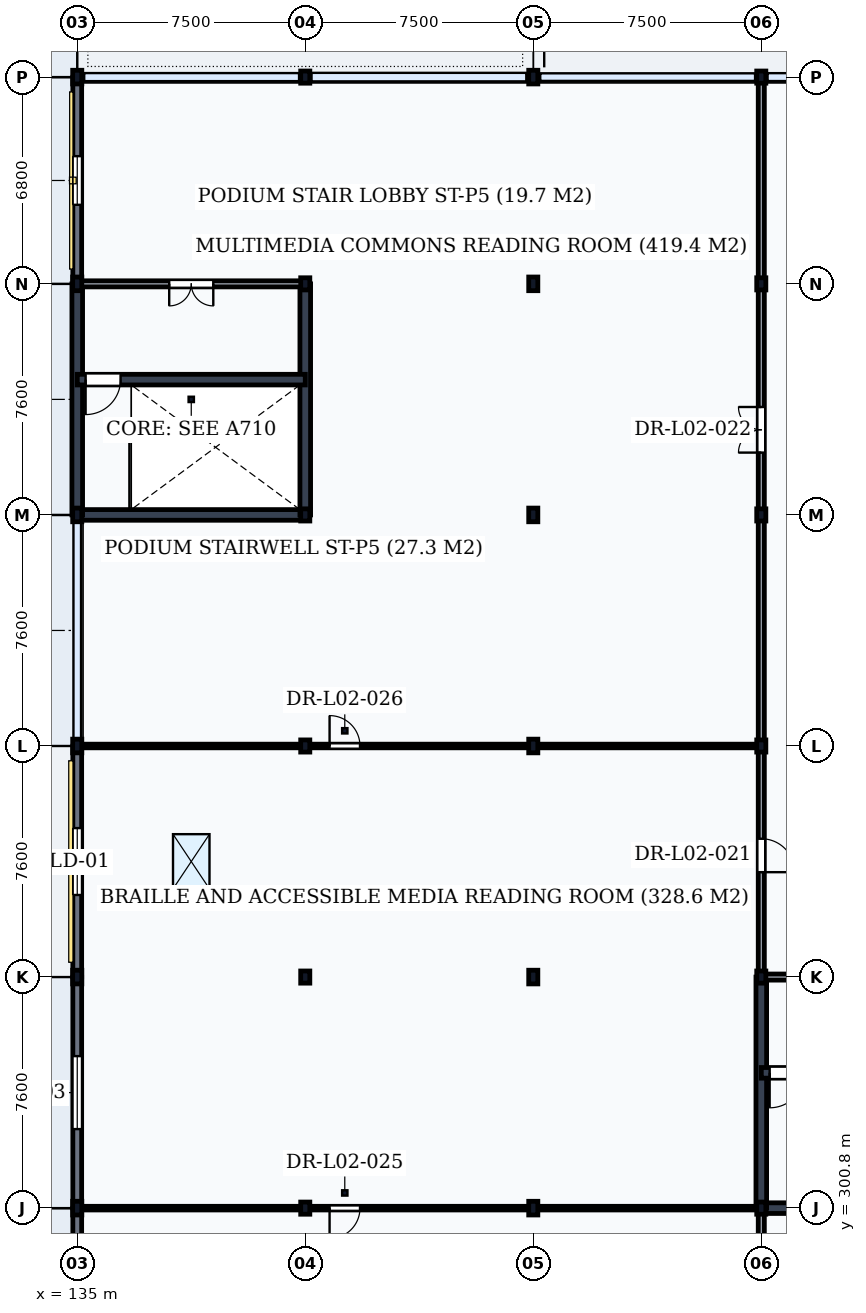
"""IFC4 building model, lengths in metres.
Left out: names, types, materials, properties, quantities, classifications, styles, units other than length and angle.
Written with IfcOpenShell. Run it as: python <this file> out.ifc"""

import sys

from ifc_helpers import new_model, si_unit, direction, frame, frame_2d, origin, origin_2d, place, context, subcontext, project, spatial, rectangle, i_section, extrude, element, fill, save


model = new_model("IFC4")
c1 = context("Model", 3, precision=1e-05, world=origin(), true_north=direction((0.0, 1.0)))
c2 = subcontext(c1, "Body", "Model", "MODEL_VIEW")
j1 = project(units=[si_unit("LENGTHUNIT", "METRE"), si_unit("PLANEANGLEUNIT", "RADIAN")], contexts=[c1])
p1 = place(None, origin())
s1 = spatial("IfcSite", under=j1, at=p1, CompositionType="ELEMENT")
p2 = place(p1, origin())
s2 = spatial("IfcBuilding", under=s1, at=p2, CompositionType="ELEMENT")
p3 = place(p2, frame((0.0, 0.0, 5.4)))
s3 = spatial("IfcBuildingStorey", under=s2, at=p3, CompositionType="ELEMENT", Elevation=5.4)
for number, where, z_axis, x_axis in (
    (1, (135.0, 300.8, 0.0), (0.0, 0.0, 1.0), (1.0, 0.0, 0.0)),
    (2, (135.0, 308.4, 0.0), (0.0, 0.0, 1.0), (1.0, 0.0, 0.0)),
    (3, (135.0, 316.0, 0.0), (0.0, 0.0, 1.0), (1.0, 0.0, 0.0)),
    (4, (135.0, 323.6, 0.0), (0.0, 0.0, 1.0), (1.0, 0.0, 0.0)),
    (5, (135.0, 331.2, 0.0), (0.0, 0.0, 1.0), (1.0, 0.0, 0.0)),
    (6, (135.0, 338.0, 0.0), (0.0, 0.0, 1.0), (1.0, 0.0, 0.0)),
):
    element("IfcColumn", number, at=place(p3, frame(where, z_axis=z_axis, x_axis=x_axis)), inside=s3, PredefinedType="COLUMN", context=c2, shape_type="SweptSolid", body=[
        extrude(i_section(OverallWidth=0.3, OverallDepth=0.45, WebThickness=0.014, FlangeThickness=0.026, FilletRadius=0.027, at=origin_2d()), origin(), (0.0, 0.0, 1.0), 5.1),
    ])
for number, where, z_axis, x_axis in (
    (7, (142.5, 300.8, 0.0), (0.0, 0.0, 1.0), (1.0, 0.0, 0.0)),
    (8, (142.5, 308.4, 0.0), (0.0, 0.0, 1.0), (1.0, 0.0, 0.0)),
    (9, (142.5, 316.0, 0.0), (0.0, 0.0, 1.0), (1.0, 0.0, 0.0)),
    (10, (142.5, 323.6, 0.0), (0.0, 0.0, 1.0), (1.0, 0.0, 0.0)),
    (11, (142.5, 331.2, 0.0), (0.0, 0.0, 1.0), (1.0, 0.0, 0.0)),
    (12, (142.5, 338.0, 0.0), (0.0, 0.0, 1.0), (1.0, 0.0, 0.0)),
):
    element("IfcColumn", number, at=place(p3, frame(where, z_axis=z_axis, x_axis=x_axis)), inside=s3, PredefinedType="COLUMN", context=c2, shape_type="SweptSolid", body=[
        extrude(i_section(OverallWidth=0.3, OverallDepth=0.4, WebThickness=0.013, FlangeThickness=0.024, FilletRadius=0.027, at=origin_2d()), origin(), (0.0, 0.0, 1.0), 5.1),
    ])
for number, where, z_axis, x_axis in (
    (13, (150.0, 300.8, 0.0), (0.0, 0.0, 1.0), (1.0, 0.0, 0.0)),
    (14, (150.0, 308.4, 0.0), (0.0, 0.0, 1.0), (1.0, 0.0, 0.0)),
    (15, (150.0, 316.0, 0.0), (0.0, 0.0, 1.0), (1.0, 0.0, 0.0)),
    (16, (150.0, 323.6, 0.0), (0.0, 0.0, 1.0), (1.0, 0.0, 0.0)),
    (17, (150.0, 331.2, 0.0), (0.0, 0.0, 1.0), (1.0, 0.0, 0.0)),
    (18, (150.0, 338.0, 0.0), (0.0, 0.0, 1.0), (1.0, 0.0, 0.0)),
):
    element("IfcColumn", number, at=place(p3, frame(where, z_axis=z_axis, x_axis=x_axis)), inside=s3, PredefinedType="COLUMN", context=c2, shape_type="SweptSolid", body=[
        extrude(i_section(OverallWidth=0.3, OverallDepth=0.45, WebThickness=0.014, FlangeThickness=0.026, FilletRadius=0.027, at=origin_2d()), origin(), (0.0, 0.0, 1.0), 5.1),
    ])
for number, where, z_axis, x_axis in (
    (19, (157.5, 300.8, 0.0), (0.0, 0.0, 1.0), (1.0, 0.0, 0.0)),
    (20, (157.5, 308.4, 0.0), (0.0, 0.0, 1.0), (1.0, 0.0, 0.0)),
    (21, (157.5, 316.0, 0.0), (0.0, 0.0, 1.0), (1.0, 0.0, 0.0)),
    (22, (157.5, 323.6, 0.0), (0.0, 0.0, 1.0), (1.0, 0.0, 0.0)),
    (23, (157.5, 331.2, 0.0), (0.0, 0.0, 1.0), (1.0, 0.0, 0.0)),
    (24, (157.5, 338.0, 0.0), (0.0, 0.0, 1.0), (1.0, 0.0, 0.0)),
):
    element("IfcColumn", number, at=place(p3, frame(where, z_axis=z_axis, x_axis=x_axis)), inside=s3, PredefinedType="COLUMN", context=c2, shape_type="SweptSolid", body=[
        extrude(i_section(OverallWidth=0.3, OverallDepth=0.4, WebThickness=0.013, FlangeThickness=0.024, FilletRadius=0.027, at=origin_2d()), origin(), (0.0, 0.0, 1.0), 5.1),
    ])
p4 = place(p3, frame((135.0, 293.206, 0.0), z_axis=(0.0, 0.0, 1.0), x_axis=(0.0, 1.0, 0.0)))
e25 = element("IfcWall", 25, at=p4, inside=s3, PredefinedType="SOLIDWALL", context=c2, shape_type="SweptSolid", body=[
    extrude(rectangle(XDim=7.588, YDim=0.29, at=frame_2d((3.794, 0.0))), origin(), (0.0, 0.0, 1.0), 4.578),
])
p5 = place(p4, frame((2.494, 0.0, 0.95)))
e26 = element("IfcOpeningElement", 26, at=p5, cuts=e25, PredefinedType="OPENING", context=c2, shape_type="SweptSolid", body=[
    extrude(rectangle(XDim=2.6, YDim=3.0, at=frame_2d((1.3, 1.5))), frame((0.0, 0.16, 0.0), z_axis=(0.0, -1.0, 0.0), x_axis=(1.0, 0.0, 0.0)), (0.0, 0.0, 1.0), 0.32),
])
p6 = place(p3, frame((135.0, 300.806, 0.0), z_axis=(0.0, 0.0, 1.0), x_axis=(0.0, 1.0, 0.0)))
e27 = element("IfcWall", 27, at=p6, inside=s3, PredefinedType="SOLIDWALL", context=c2, shape_type="SweptSolid", body=[
    extrude(rectangle(XDim=7.588, YDim=0.29, at=frame_2d((3.794, 0.0))), origin(), (0.0, 0.0, 1.0), 4.578),
])
p7 = place(p6, frame((2.594, 0.0, 0.95)))
e28 = element("IfcOpeningElement", 28, at=p7, cuts=e27, PredefinedType="OPENING", context=c2, shape_type="SweptSolid", body=[
    extrude(rectangle(XDim=2.4, YDim=2.8, at=frame_2d((1.2, 1.4))), frame((0.0, 0.16, 0.0), z_axis=(0.0, -1.0, 0.0), x_axis=(1.0, 0.0, 0.0)), (0.0, 0.0, 1.0), 0.32),
])
p8 = place(p3, frame((135.0, 308.406, 0.0), z_axis=(0.0, 0.0, 1.0), x_axis=(0.0, 1.0, 0.0)))
e29 = element("IfcWall", 29, at=p8, inside=s3, PredefinedType="SOLIDWALL", context=c2, shape_type="SweptSolid", body=[
    extrude(rectangle(XDim=7.588, YDim=0.29, at=frame_2d((3.794, 0.0))), origin(), (0.0, 0.0, 1.0), 4.578),
])
p9 = place(p8, frame((2.694, 0.0, 0.95)))
e30 = element("IfcOpeningElement", 30, at=p9, cuts=e29, PredefinedType="OPENING", context=c2, shape_type="SweptSolid", body=[
    extrude(rectangle(XDim=2.2, YDim=2.8, at=frame_2d((1.1, 1.4))), frame((0.0, 0.16, 0.0), z_axis=(0.0, -1.0, 0.0), x_axis=(1.0, 0.0, 0.0)), (0.0, 0.0, 1.0), 0.32),
])
p10 = place(p3, frame((135.0, 331.206, 0.0), z_axis=(0.0, 0.0, 1.0), x_axis=(0.0, 1.0, 0.0)))
e31 = element("IfcWall", 31, at=p10, inside=s3, PredefinedType="SOLIDWALL", context=c2, shape_type="SweptSolid", body=[
    extrude(rectangle(XDim=6.788, YDim=0.29, at=frame_2d((3.394, 0.0))), origin(), (0.0, 0.0, 1.0), 4.618),
])
p11 = place(p10, frame((2.594, 0.0, 0.95)))
e32 = element("IfcOpeningElement", 32, at=p11, cuts=e31, PredefinedType="OPENING", context=c2, shape_type="SweptSolid", body=[
    extrude(rectangle(XDim=1.6, YDim=2.4, at=frame_2d((0.8, 1.2))), frame((0.0, 0.16, 0.0), z_axis=(0.0, -1.0, 0.0), x_axis=(1.0, 0.0, 0.0)), (0.0, 0.0, 1.0), 0.32),
])
p12 = place(p3, frame((135.1, 337.9, 5.1), z_axis=(0.0, 0.0, 1.0), x_axis=(1.0, 0.0, 0.0)))
e33 = element("IfcWall", 33, at=p12, inside=s3, PredefinedType="PARAPET", context=c2, shape_type="SweptSolid", body=[
    extrude(rectangle(XDim=14.8, YDim=0.18, at=frame_2d((7.4, 0.0))), origin(), (0.0, 0.0, 1.0), 1.2),
])
p13 = place(p3, frame((135.1, 248.6, 5.1), z_axis=(0.0, 0.0, 1.0), x_axis=(0.0, 1.0, 0.0)))
e34 = element("IfcWall", 34, at=p13, inside=s3, PredefinedType="PARAPET", context=c2, shape_type="SweptSolid", body=[
    extrude(rectangle(XDim=89.2, YDim=0.18, at=frame_2d((44.6, 0.0))), origin(), (0.0, 0.0, 1.0), 1.2),
])
p14 = place(p3, frame((150.1, 337.9, 5.1), z_axis=(0.0, 0.0, 1.0), x_axis=(1.0, 0.0, 0.0)))
e35 = element("IfcWall", 35, at=p14, inside=s3, PredefinedType="PARAPET", context=c2, shape_type="SweptSolid", body=[
    extrude(rectangle(XDim=7.3, YDim=0.18, at=frame_2d((3.65, 0.0))), origin(), (0.0, 0.0, 1.0), 1.2),
])
p15 = place(p3, frame((157.6, 337.9, 5.1), z_axis=(0.0, 0.0, 1.0), x_axis=(1.0, 0.0, 0.0)))
e36 = element("IfcWall", 36, at=p15, inside=s3, PredefinedType="PARAPET", context=c2, shape_type="SweptSolid", body=[
    extrude(rectangle(XDim=97.3, YDim=0.18, at=frame_2d((48.65, 0.0))), origin(), (0.0, 0.0, 1.0), 1.2),
])
p16 = place(p3, frame((157.5, 300.8, 0.0), z_axis=(0.0, 0.0, 1.0), x_axis=(1.0, 0.0, 0.0)))
e37 = element("IfcWall", 37, at=p16, inside=s3, PredefinedType="SHEAR", context=c2, shape_type="SweptSolid", body=[
    extrude(rectangle(XDim=7.5, YDim=0.35, at=frame_2d((3.75, 0.0))), origin(), (0.0, 0.0, 1.0), 4.86),
])
p17 = place(p3, frame((157.5, 300.8, 0.0), z_axis=(0.0, 0.0, 1.0), x_axis=(0.0, 1.0, 0.0)))
e38 = element("IfcWall", 38, at=p17, inside=s3, PredefinedType="SHEAR", context=c2, shape_type="SweptSolid", body=[
    extrude(rectangle(XDim=7.6, YDim=0.35, at=frame_2d((3.8, 0.0))), origin(), (0.0, 0.0, 1.0), 4.86),
])
p18 = place(p3, frame((157.5, 305.25, 0.0), z_axis=(0.0, 0.0, 1.0), x_axis=(1.0, 0.0, 0.0)))
e39 = element("IfcWall", 39, at=p18, inside=s3, PredefinedType="SHEAR", context=c2, shape_type="SweptSolid", body=[
    extrude(rectangle(XDim=7.5, YDim=0.35, at=frame_2d((3.75, 0.0))), origin(), (0.0, 0.0, 1.0), 4.86),
])
p19 = place(p18, frame((0.275, 0.0, 0.0)))
e40 = element("IfcOpeningElement", 40, at=p19, cuts=e39, PredefinedType="OPENING", context=c2, shape_type="SweptSolid", body=[
    extrude(rectangle(XDim=1.15, YDim=2.15, at=frame_2d((0.575, 1.075))), frame((0.0, 0.19, 0.0), z_axis=(0.0, -1.0, 0.0), x_axis=(1.0, 0.0, 0.0)), (0.0, 0.0, 1.0), 0.38),
])
p20 = place(p3, frame((157.5, 308.4, 0.0), z_axis=(0.0, 0.0, 1.0), x_axis=(1.0, 0.0, 0.0)))
e41 = element("IfcWall", 41, at=p20, inside=s3, PredefinedType="PARTITIONING", context=c2, shape_type="SweptSolid", body=[
    extrude(rectangle(XDim=7.5, YDim=0.2, at=frame_2d((3.75, 0.0))), origin(), (0.0, 0.0, 1.0), 4.498),
])
p21 = place(p20, frame((3.025, 0.0, 0.0)))
e42 = element("IfcOpeningElement", 42, at=p21, cuts=e41, PredefinedType="OPENING", context=c2, shape_type="SweptSolid", body=[
    extrude(rectangle(XDim=1.45, YDim=2.2, at=frame_2d((0.725, 1.1))), frame((0.0, 0.115, 0.0), z_axis=(0.0, -1.0, 0.0), x_axis=(1.0, 0.0, 0.0)), (0.0, 0.0, 1.0), 0.23),
])
p22 = place(p3, frame((135.0, 323.6, 0.0), z_axis=(0.0, 0.0, 1.0), x_axis=(1.0, 0.0, 0.0)))
e43 = element("IfcWall", 43, at=p22, inside=s3, PredefinedType="SHEAR", context=c2, shape_type="SweptSolid", body=[
    extrude(rectangle(XDim=7.5, YDim=0.35, at=frame_2d((3.75, 0.0))), origin(), (0.0, 0.0, 1.0), 4.85),
])
for number, where, z_axis, x_axis in (
    (44, (135.0, 323.6, 0.0), (0.0, 0.0, 1.0), (0.0, 1.0, 0.0)),
    (45, (142.5, 323.6, 0.0), (0.0, 0.0, 1.0), (0.0, 1.0, 0.0)),
):
    element("IfcWall", number, at=place(p3, frame(where, z_axis=z_axis, x_axis=x_axis)), inside=s3, PredefinedType="SHEAR", context=c2, shape_type="SweptSolid", body=[
        extrude(rectangle(XDim=7.6, YDim=0.35, at=frame_2d((3.8, 0.0))), origin(), (0.0, 0.0, 1.0), 4.85),
    ])
p23 = place(p3, frame((135.0, 328.05, 0.0), z_axis=(0.0, 0.0, 1.0), x_axis=(1.0, 0.0, 0.0)))
e46 = element("IfcWall", 46, at=p23, inside=s3, PredefinedType="SHEAR", context=c2, shape_type="SweptSolid", body=[
    extrude(rectangle(XDim=7.5, YDim=0.35, at=frame_2d((3.75, 0.0))), origin(), (0.0, 0.0, 1.0), 4.85),
])
p24 = place(p23, frame((0.275, 0.0, 0.0)))
e47 = element("IfcOpeningElement", 47, at=p24, cuts=e46, PredefinedType="OPENING", context=c2, shape_type="SweptSolid", body=[
    extrude(rectangle(XDim=1.15, YDim=2.15, at=frame_2d((0.575, 1.075))), frame((0.0, 0.19, 0.0), z_axis=(0.0, -1.0, 0.0), x_axis=(1.0, 0.0, 0.0)), (0.0, 0.0, 1.0), 0.38),
])
p25 = place(p3, frame((135.0, 331.2, 0.0), z_axis=(0.0, 0.0, 1.0), x_axis=(1.0, 0.0, 0.0)))
e48 = element("IfcWall", 48, at=p25, inside=s3, PredefinedType="PARTITIONING", context=c2, shape_type="SweptSolid", body=[
    extrude(rectangle(XDim=7.5, YDim=0.2, at=frame_2d((3.75, 0.0))), origin(), (0.0, 0.0, 1.0), 4.488),
])
p26 = place(p25, frame((3.025, 0.0, 0.0)))
e49 = element("IfcOpeningElement", 49, at=p26, cuts=e48, PredefinedType="OPENING", context=c2, shape_type="SweptSolid", body=[
    extrude(rectangle(XDim=1.45, YDim=2.2, at=frame_2d((0.725, 1.1))), frame((0.0, 0.115, 0.0), z_axis=(0.0, -1.0, 0.0), x_axis=(1.0, 0.0, 0.0)), (0.0, 0.0, 1.0), 0.23),
])
p27 = place(p3, frame((157.5, 258.2, 0.0), z_axis=(0.0, 0.0, 1.0), x_axis=(0.0, 1.0, 0.0)))
e50 = element("IfcWall", 50, at=p27, inside=s3, PredefinedType="PARTITIONING", context=c2, shape_type="SweptSolid", body=[
    extrude(rectangle(XDim=42.6, YDim=0.2, at=frame_2d((21.3, 0.0))), origin(), (0.0, 0.0, 1.0), 4.498),
])
p28 = place(p27, frame((9.45, 0.0, 0.0)))
e51 = element("IfcOpeningElement", 51, at=p28, cuts=e50, PredefinedType="OPENING", context=c2, shape_type="SweptSolid", body=[
    extrude(rectangle(XDim=1.1, YDim=2.1, at=frame_2d((0.55, 1.05))), frame((0.0, 0.115, 0.0), z_axis=(0.0, -1.0, 0.0), x_axis=(1.0, 0.0, 0.0)), (0.0, 0.0, 1.0), 0.23),
])
p29 = place(p27, frame((30.45, 0.0, 0.0)))
e52 = element("IfcOpeningElement", 52, at=p29, cuts=e50, PredefinedType="OPENING", context=c2, shape_type="SweptSolid", body=[
    extrude(rectangle(XDim=1.1, YDim=2.1, at=frame_2d((0.55, 1.05))), frame((0.0, 0.115, 0.0), z_axis=(0.0, -1.0, 0.0), x_axis=(1.0, 0.0, 0.0)), (0.0, 0.0, 1.0), 0.23),
])
p30 = place(p3, frame((157.5, 308.4, 0.0), z_axis=(0.0, 0.0, 1.0), x_axis=(0.0, 1.0, 0.0)))
e53 = element("IfcWall", 53, at=p30, inside=s3, PredefinedType="PARTITIONING", context=c2, shape_type="SweptSolid", body=[
    extrude(rectangle(XDim=29.6, YDim=0.2, at=frame_2d((14.8, 0.0))), origin(), (0.0, 0.0, 1.0), 4.498),
])
p31 = place(p30, frame((3.45, 0.0, 0.0)))
e54 = element("IfcOpeningElement", 54, at=p31, cuts=e53, PredefinedType="OPENING", context=c2, shape_type="SweptSolid", body=[
    extrude(rectangle(XDim=1.1, YDim=2.1, at=frame_2d((0.55, 1.05))), frame((0.0, 0.115, 0.0), z_axis=(0.0, -1.0, 0.0), x_axis=(1.0, 0.0, 0.0)), (0.0, 0.0, 1.0), 0.23),
])
p32 = place(p30, frame((17.25, 0.0, 0.0)))
e55 = element("IfcOpeningElement", 55, at=p32, cuts=e53, PredefinedType="OPENING", context=c2, shape_type="SweptSolid", body=[
    extrude(rectangle(XDim=1.5, YDim=2.25, at=frame_2d((0.75, 1.125))), frame((0.0, 0.115, 0.0), z_axis=(0.0, -1.0, 0.0), x_axis=(1.0, 0.0, 0.0)), (0.0, 0.0, 1.0), 0.23),
])
p33 = place(p3, frame((135.0, 300.8, 0.0), z_axis=(0.0, 0.0, 1.0), x_axis=(1.0, 0.0, 0.0)))
e56 = element("IfcWall", 56, at=p33, inside=s3, PredefinedType="PARTITIONING", context=c2, shape_type="SweptSolid", body=[
    extrude(rectangle(XDim=22.5, YDim=0.12, at=frame_2d((11.25, 0.0))), origin(), (0.0, 0.0, 1.0), 4.488),
])
p34 = place(p33, frame((8.3, 0.0, 0.0)))
e57 = element("IfcOpeningElement", 57, at=p34, cuts=e56, PredefinedType="OPENING", context=c2, shape_type="SweptSolid", body=[
    extrude(rectangle(XDim=1.0, YDim=2.1, at=frame_2d((0.5, 1.05))), frame((0.0, 0.075, 0.0), z_axis=(0.0, -1.0, 0.0), x_axis=(1.0, 0.0, 0.0)), (0.0, 0.0, 1.0), 0.15),
])
p35 = place(p3, frame((135.0, 316.0, 0.0), z_axis=(0.0, 0.0, 1.0), x_axis=(1.0, 0.0, 0.0)))
e58 = element("IfcWall", 58, at=p35, inside=s3, PredefinedType="PARTITIONING", context=c2, shape_type="SweptSolid", body=[
    extrude(rectangle(XDim=22.5, YDim=0.12, at=frame_2d((11.25, 0.0))), origin(), (0.0, 0.0, 1.0), 4.488),
])
p36 = place(p35, frame((8.3, 0.0, 0.0)))
e59 = element("IfcOpeningElement", 59, at=p36, cuts=e58, PredefinedType="OPENING", context=c2, shape_type="SweptSolid", body=[
    extrude(rectangle(XDim=1.0, YDim=2.1, at=frame_2d((0.5, 1.05))), frame((0.0, 0.075, 0.0), z_axis=(0.0, -1.0, 0.0), x_axis=(1.0, 0.0, 0.0)), (0.0, 0.0, 1.0), 0.15),
])
p37 = place(p7, origin())
e60 = element("IfcWindow", 60, at=p37, inside=s3, PartitioningType="DOUBLE_PANEL_VERTICAL", PredefinedType="WINDOW", context=c2, shape_type="SweptSolid", body=[
    extrude(rectangle(XDim=2.4, YDim=2.8, at=frame_2d((1.2, 1.4))), frame((0.0, 0.03, 0.0), z_axis=(0.0, -1.0, 0.0), x_axis=(1.0, 0.0, 0.0)), (0.0, 0.0, 1.0), 0.06),
])
fill(e28, e60)
p38 = place(p9, origin())
e61 = element("IfcWindow", 61, at=p38, inside=s3, PartitioningType="DOUBLE_PANEL_VERTICAL", PredefinedType="WINDOW", context=c2, shape_type="SweptSolid", body=[
    extrude(rectangle(XDim=2.2, YDim=2.8, at=frame_2d((1.1, 1.4))), frame((0.0, 0.03, 0.0), z_axis=(0.0, -1.0, 0.0), x_axis=(1.0, 0.0, 0.0)), (0.0, 0.0, 1.0), 0.06),
])
fill(e30, e61)
p39 = place(p11, origin())
e62 = element("IfcWindow", 62, at=p39, inside=s3, PartitioningType="SINGLE_PANEL", PredefinedType="WINDOW", context=c2, shape_type="SweptSolid", body=[
    extrude(rectangle(XDim=1.6, YDim=2.4, at=frame_2d((0.8, 1.2))), frame((0.0, 0.03, 0.0), z_axis=(0.0, -1.0, 0.0), x_axis=(1.0, 0.0, 0.0)), (0.0, 0.0, 1.0), 0.06),
])
fill(e32, e62)
p40 = place(p2, frame((0.0, 0.0, 10.5)))
p41 = place(p40, frame((0.0, 0.0, -0.25)))
p42 = place(p41, frame((138.75, 312.2, -0.01)))
p43 = place(p42, frame((0.0, 0.0, 0.21)))
e63 = element("IfcWindow", 63, at=p43, inside=s3, PartitioningType="SINGLE_PANEL", PredefinedType="SKYLIGHT", context=c2, shape_type="SweptSolid", body=[
    extrude(rectangle(XDim=1.2, YDim=1.8, at=origin_2d()), origin(), (0.0, 0.0, 1.0), 0.05),
])
p44 = place(p19, frame((1.15, 0.0, 0.0), z_axis=(0.0, 0.0, 1.0), x_axis=(-1.0, 0.0, 0.0)))
e64 = element("IfcDoor", 64, at=p44, inside=s3, OperationType="SINGLE_SWING_RIGHT", PredefinedType="DOOR", context=c2, shape_type="SweptSolid", body=[
    extrude(rectangle(XDim=1.15, YDim=2.15, at=frame_2d((0.575, 1.075))), frame((0.0, 0.025, 0.0), z_axis=(0.0, -1.0, 0.0), x_axis=(1.0, 0.0, 0.0)), (0.0, 0.0, 1.0), 0.05),
])
fill(e40, e64)
p45 = place(p24, frame((1.15, 0.0, 0.0), z_axis=(0.0, 0.0, 1.0), x_axis=(-1.0, 0.0, 0.0)))
e65 = element("IfcDoor", 65, at=p45, inside=s3, OperationType="SINGLE_SWING_RIGHT", PredefinedType="DOOR", context=c2, shape_type="SweptSolid", body=[
    extrude(rectangle(XDim=1.15, YDim=2.15, at=frame_2d((0.575, 1.075))), frame((0.0, 0.025, 0.0), z_axis=(0.0, -1.0, 0.0), x_axis=(1.0, 0.0, 0.0)), (0.0, 0.0, 1.0), 0.05),
])
fill(e47, e65)
p46 = place(p26, frame((1.45, 0.0, 0.0), z_axis=(0.0, 0.0, 1.0), x_axis=(-1.0, 0.0, 0.0)))
e66 = element("IfcDoor", 66, at=p46, inside=s3, OperationType="DOUBLE_DOOR_SINGLE_SWING", PredefinedType="DOOR", context=c2, shape_type="SweptSolid", body=[
    extrude(rectangle(XDim=1.45, YDim=2.2, at=frame_2d((0.725, 1.1))), frame((0.0, 0.025, 0.0), z_axis=(0.0, -1.0, 0.0), x_axis=(1.0, 0.0, 0.0)), (0.0, 0.0, 1.0), 0.05),
])
fill(e49, e66)
p47 = place(p31, frame((1.1, 0.0, 0.0), z_axis=(0.0, 0.0, 1.0), x_axis=(-1.0, 0.0, 0.0)))
e67 = element("IfcDoor", 67, at=p47, inside=s3, OperationType="SINGLE_SWING_RIGHT", PredefinedType="DOOR", context=c2, shape_type="SweptSolid", body=[
    extrude(rectangle(XDim=1.1, YDim=2.1, at=frame_2d((0.55, 1.05))), frame((0.0, 0.025, 0.0), z_axis=(0.0, -1.0, 0.0), x_axis=(1.0, 0.0, 0.0)), (0.0, 0.0, 1.0), 0.05),
])
fill(e54, e67)
p48 = place(p32, origin())
e68 = element("IfcDoor", 68, at=p48, inside=s3, OperationType="DOUBLE_DOOR_SINGLE_SWING", PredefinedType="DOOR", context=c2, shape_type="SweptSolid", body=[
    extrude(rectangle(XDim=1.5, YDim=2.25, at=frame_2d((0.75, 1.125))), frame((0.0, 0.025, 0.0), z_axis=(0.0, -1.0, 0.0), x_axis=(1.0, 0.0, 0.0)), (0.0, 0.0, 1.0), 0.05),
])
fill(e55, e68)
p49 = place(p34, frame((1.0, 0.0, 0.0), z_axis=(0.0, 0.0, 1.0), x_axis=(-1.0, 0.0, 0.0)))
e69 = element("IfcDoor", 69, at=p49, inside=s3, OperationType="SINGLE_SWING_RIGHT", PredefinedType="DOOR", context=c2, shape_type="SweptSolid", body=[
    extrude(rectangle(XDim=1.0, YDim=2.1, at=frame_2d((0.5, 1.05))), frame((0.0, 0.025, 0.0), z_axis=(0.0, -1.0, 0.0), x_axis=(1.0, 0.0, 0.0)), (0.0, 0.0, 1.0), 0.05),
])
fill(e57, e69)
p50 = place(p36, origin())
e70 = element("IfcDoor", 70, at=p50, inside=s3, OperationType="SINGLE_SWING_LEFT", PredefinedType="DOOR", context=c2, shape_type="SweptSolid", body=[
    extrude(rectangle(XDim=1.0, YDim=2.1, at=frame_2d((0.5, 1.05))), frame((0.0, 0.025, 0.0), z_axis=(0.0, -1.0, 0.0), x_axis=(1.0, 0.0, 0.0)), (0.0, 0.0, 1.0), 0.05),
])
fill(e59, e70)
save(model, sys.argv[1])
